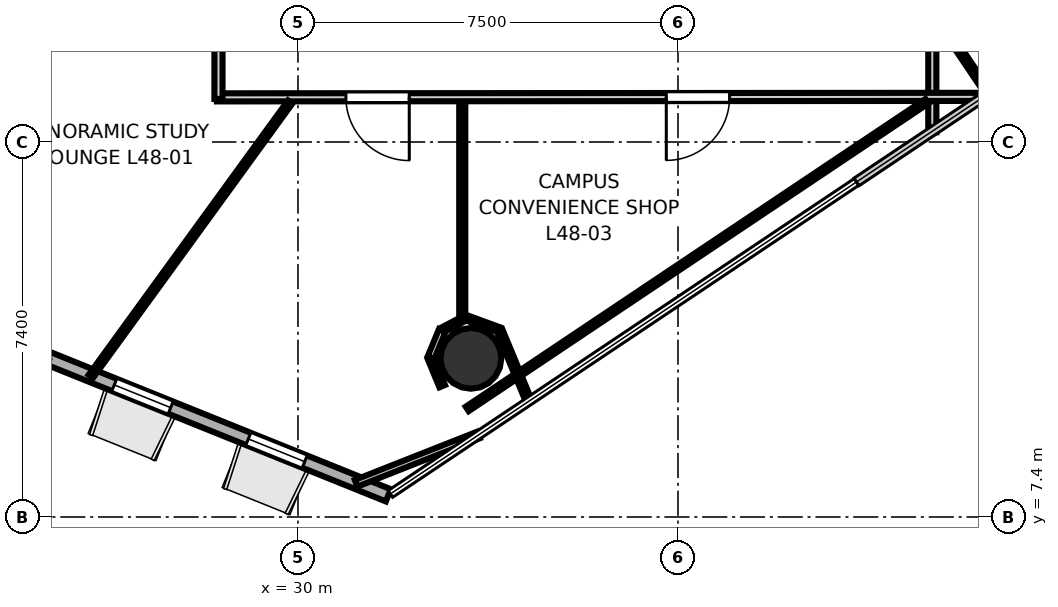
"""IFC4 building model, lengths in metres.
Left out: names, types, materials, properties, quantities, classifications, styles, units other than length and angle.
Written with IfcOpenShell. Run it as: python <this file> out.ifc"""

import sys

from ifc_helpers import new_model, si_unit, direction, frame, frame_2d, origin, origin_2d, place, context, subcontext, project, spatial, rectangle, hollow_circle, extrude, element, fill, save


model = new_model("IFC4")
c1 = context("Model", 3, precision=1e-05, world=origin(), true_north=direction((0.0, 1.0)))
c2 = subcontext(c1, "Body", "Model", "MODEL_VIEW")
j1 = project(units=[si_unit("LENGTHUNIT", "METRE"), si_unit("PLANEANGLEUNIT", "RADIAN")], contexts=[c1])
p1 = place(None, origin())
s1 = spatial("IfcSite", under=j1, at=p1, CompositionType="ELEMENT")
p2 = place(p1, origin())
s2 = spatial("IfcBuilding", under=s1, at=p2, CompositionType="ELEMENT")
p3 = place(p2, frame((0.0, 0.0, 189.2)))
s3 = spatial("IfcBuildingStorey", under=s2, at=p3, CompositionType="ELEMENT", Elevation=189.2)
p4 = place(p3, frame((33.413, 10.531, -0.23), z_axis=(0.0, 0.0, 1.0), x_axis=(1.0, 0.0, 0.0)))
e1 = element("IfcColumn", 1, at=p4, inside=s3, PredefinedType="COLUMN", context=c2, shape_type="SweptSolid", body=[
    extrude(hollow_circle(Radius=0.6, WallThickness=0.03, at=origin_2d()), origin(), (0.0, 0.0, 1.0), 3.93),
])
p5 = place(p3, frame((24.428, 10.791, 0.0), z_axis=(0.0, 0.0, 1.0), x_axis=(0.927535144365, -0.373735944174, 0.0)))
e2 = element("IfcWall", 2, at=p5, inside=s3, PredefinedType="SOLIDWALL", context=c2, shape_type="SweptSolid", body=[
    extrude(rectangle(XDim=7.929, YDim=0.26, at=frame_2d((3.964, 0.0))), origin(), (0.0, 0.0, 1.0), 3.52),
])
p6 = place(p5, frame((2.099, 0.0, 0.9)))
e3 = element("IfcOpeningElement", 3, at=p6, cuts=e2, PredefinedType="OPENING", context=c2, shape_type="SweptSolid", body=[
    extrude(rectangle(XDim=1.2, YDim=2.0, at=frame_2d((0.6, 1.0))), frame((0.0, 0.14, 0.0), z_axis=(0.0, -1.0, 0.0), x_axis=(1.0, 0.0, 0.0)), (0.0, 0.0, 1.0), 0.28),
])
p7 = place(p5, frame((4.95, 0.0, 0.9)))
e4 = element("IfcOpeningElement", 4, at=p7, cuts=e2, PredefinedType="OPENING", context=c2, shape_type="SweptSolid", body=[
    extrude(rectangle(XDim=1.2, YDim=2.0, at=frame_2d((0.6, 1.0))), frame((0.0, 0.14, 0.0), z_axis=(0.0, -1.0, 0.0), x_axis=(1.0, 0.0, 0.0)), (0.0, 0.0, 1.0), 0.28),
])
p8 = place(p3, frame((42.519, 17.98, 0.0), z_axis=(0.0, 0.0, 1.0), x_axis=(0.0, -1.0, 0.0)))
e5 = element("IfcWall", 5, at=p8, inside=s3, PredefinedType="PARTITIONING", context=c2, shape_type="SweptSolid", body=[
    extrude(rectangle(XDim=2.987, YDim=0.16, at=frame_2d((1.494, 0.0))), origin(), (0.0, 0.0, 1.0), 2.84),
])
p9 = place(p3, frame((43.552, 15.691, 0.0), z_axis=(0.0, 0.0, 1.0), x_axis=(-0.999999781798, -0.00066060826, 0.0)))
e6 = element("IfcWall", 6, at=p9, inside=s3, PredefinedType="PARTITIONING", context=c2, shape_type="SweptSolid", body=[
    extrude(rectangle(XDim=15.152, YDim=0.16, at=frame_2d((7.576, 0.0))), origin(), (0.0, 0.0, 1.0), 2.84),
])
p10 = place(p9, frame((11.356, 0.0, 0.0)))
e7 = element("IfcOpeningElement", 7, at=p10, cuts=e6, PredefinedType="OPENING", context=c2, shape_type="SweptSolid", body=[
    extrude(rectangle(XDim=1.25, YDim=2.2, at=frame_2d((0.625, 1.1))), frame((0.0, 0.09, 0.0), z_axis=(0.0, -1.0, 0.0), x_axis=(1.0, 0.0, 0.0)), (0.0, 0.0, 1.0), 0.18),
])
p11 = place(p9, frame((5.033, 0.0, 0.0)))
e8 = element("IfcOpeningElement", 8, at=p11, cuts=e6, PredefinedType="OPENING", context=c2, shape_type="SweptSolid", body=[
    extrude(rectangle(XDim=1.25, YDim=2.2, at=frame_2d((0.625, 1.1))), frame((0.0, 0.09, 0.0), z_axis=(0.0, -1.0, 0.0), x_axis=(1.0, 0.0, 0.0)), (0.0, 0.0, 1.0), 0.18),
])
p12 = place(p3, frame((28.431, 15.65, 0.0), z_axis=(0.0, 0.0, 1.0), x_axis=(0.0, 1.0, 0.0)))
e9 = element("IfcWall", 9, at=p12, inside=s3, PredefinedType="PARTITIONING", context=c2, shape_type="SweptSolid", body=[
    extrude(rectangle(XDim=2.4, YDim=0.16, at=frame_2d((1.2, 0.0))), origin(), (0.0, 0.0, 1.0), 2.84),
])
p13 = place(p3, frame((29.846, 15.589, 0.0), z_axis=(0.0, 0.0, 1.0), x_axis=(-0.587807387447, -0.809000911781, 0.0)))
e10 = element("IfcWall", 10, at=p13, inside=s3, PredefinedType="PARTITIONING", context=c2, shape_type="SweptSolid", body=[
    extrude(rectangle(XDim=6.695, YDim=0.105, at=frame_2d((3.348, 0.0))), origin(), (0.0, 0.0, 1.0), 2.84),
])
p14 = place(p3, frame((33.259, 11.305, 0.0), z_axis=(0.0, 0.0, 1.0), x_axis=(-0.885224512644, -0.465164016466, 0.0)))
e11 = element("IfcWall", 11, at=p14, inside=s3, PredefinedType="PARTITIONING", context=c2, shape_type="SweptSolid", body=[
    extrude(rectangle(XDim=0.449, YDim=0.105, at=frame_2d((0.225, 0.0))), origin(), (0.0, 0.0, 1.0), 2.84),
])
p15 = place(p3, frame((32.847, 11.08, 0.0), z_axis=(0.0, 0.0, 1.0), x_axis=(-0.382438308323, -0.923981028121, 0.0)))
e12 = element("IfcWall", 12, at=p15, inside=s3, PredefinedType="PARTITIONING", context=c2, shape_type="SweptSolid", body=[
    extrude(rectangle(XDim=0.582, YDim=0.14, at=frame_2d((0.291, 0.0))), origin(), (0.0, 0.0, 1.0), 2.84),
])
p16 = place(p3, frame((32.625, 10.519, 0.0), z_axis=(0.0, 0.0, 1.0), x_axis=(0.382438308323, -0.923981028121, 0.0)))
e13 = element("IfcWall", 13, at=p16, inside=s3, PredefinedType="PARTITIONING", context=c2, shape_type="SweptSolid", body=[
    extrude(rectangle(XDim=0.582, YDim=0.12, at=frame_2d((0.291, 0.0))), origin(), (0.0, 0.0, 1.0), 2.84),
])
p17 = place(p3, frame((33.562, 9.019, 0.0), z_axis=(0.0, 0.0, 1.0), x_axis=(-0.930166208408, -0.367138699588, 0.0)))
e14 = element("IfcWall", 14, at=p17, inside=s3, PredefinedType="PARTITIONING", context=c2, shape_type="SweptSolid", body=[
    extrude(rectangle(XDim=2.596, YDim=0.14, at=frame_2d((1.298, 0.0))), origin(), (0.0, 0.0, 1.0), 2.84),
])
p18 = place(p3, frame((33.242, 15.573, 0.0), z_axis=(0.0, 0.0, 1.0), x_axis=(0.0, -1.0, 0.0)))
e15 = element("IfcWall", 15, at=p18, inside=s3, PredefinedType="PARTITIONING", context=c2, shape_type="SweptSolid", body=[
    extrude(rectangle(XDim=4.296, YDim=0.12, at=frame_2d((2.148, 0.0))), origin(), (0.0, 0.0, 1.0), 2.84),
])
p19 = place(p3, frame((34.565, 9.666, 0.0), z_axis=(0.0, 0.0, 1.0), x_axis=(-0.382689777405, 0.923876904284, 0.0)))
e16 = element("IfcWall", 16, at=p19, inside=s3, PredefinedType="PARTITIONING", context=c2, shape_type="SweptSolid", body=[
    extrude(rectangle(XDim=1.531, YDim=0.12, at=frame_2d((0.766, 0.0))), origin(), (0.0, 0.0, 1.0), 2.84),
])
p20 = place(p3, frame((33.961, 11.097, 0.0), z_axis=(0.0, 0.0, 1.0), x_axis=(-0.939001149959, 0.343914001425, 0.0)))
e17 = element("IfcWall", 17, at=p20, inside=s3, PredefinedType="PARTITIONING", context=c2, shape_type="SweptSolid", body=[
    extrude(rectangle(XDim=0.632, YDim=0.105, at=frame_2d((0.316, 0.0))), origin(), (0.0, 0.0, 1.0), 2.84),
])
p21 = place(p3, frame((42.413, 15.605, 0.0), z_axis=(0.0, 0.0, 1.0), x_axis=(-0.831051244533, -0.556195854857, 0.0)))
e18 = element("IfcWall", 18, at=p21, inside=s3, PredefinedType="PARTITIONING", context=c2, shape_type="SweptSolid", body=[
    extrude(rectangle(XDim=10.917, YDim=0.105, at=frame_2d((5.459, 0.0))), origin(), (0.0, 0.0, 1.0), 2.84),
])
p22 = place(p3, frame((43.64, 15.739, 0.0), z_axis=(0.0, 0.0, 1.0), x_axis=(-0.558754040284, 0.829333420565, 0.0)))
e19 = element("IfcWall", 19, at=p22, inside=s3, PredefinedType="PARTITIONING", context=c2, shape_type="SweptSolid", body=[
    extrude(rectangle(XDim=1.762, YDim=0.12, at=frame_2d((0.881, 0.0))), origin(), (0.0, 0.0, 1.0), 2.84),
])
p23 = place(p10, origin())
e20 = element("IfcDoor", 20, at=p23, inside=s3, OperationType="SINGLE_SWING_LEFT", PredefinedType="DOOR", context=c2, shape_type="SweptSolid", body=[
    extrude(rectangle(XDim=1.25, YDim=2.2, at=frame_2d((0.625, 1.1))), frame((0.0, 0.025, 0.0), z_axis=(0.0, -1.0, 0.0), x_axis=(1.0, 0.0, 0.0)), (0.0, 0.0, 1.0), 0.05),
])
fill(e7, e20)
p24 = place(p11, origin())
e21 = element("IfcDoor", 21, at=p24, inside=s3, OperationType="SINGLE_SWING_RIGHT", PredefinedType="DOOR", context=c2, shape_type="SweptSolid", body=[
    extrude(rectangle(XDim=1.25, YDim=2.2, at=frame_2d((0.625, 1.1))), frame((0.0, 0.025, 0.0), z_axis=(0.0, -1.0, 0.0), x_axis=(1.0, 0.0, 0.0)), (0.0, 0.0, 1.0), 0.05),
])
fill(e8, e21)
p25 = place(p6, origin())
e22 = element("IfcWindow", 22, at=p25, inside=s3, PartitioningType="SINGLE_PANEL", PredefinedType="WINDOW", context=c2, shape_type="SweptSolid", body=[
    extrude(rectangle(XDim=1.2, YDim=2.0, at=frame_2d((0.6, 1.0))), frame((0.0, 0.03, 0.0), z_axis=(0.0, -1.0, 0.0), x_axis=(1.0, 0.0, 0.0)), (0.0, 0.0, 1.0), 0.06),
])
fill(e3, e22)
p26 = place(p7, origin())
e23 = element("IfcWindow", 23, at=p26, inside=s3, PartitioningType="SINGLE_PANEL", PredefinedType="WINDOW", context=c2, shape_type="SweptSolid", body=[
    extrude(rectangle(XDim=1.2, YDim=2.0, at=frame_2d((0.6, 1.0))), frame((0.0, 0.03, 0.0), z_axis=(0.0, -1.0, 0.0), x_axis=(1.0, 0.0, 0.0)), (0.0, 0.0, 1.0), 0.06),
])
fill(e4, e23)
save(model, sys.argv[1])
